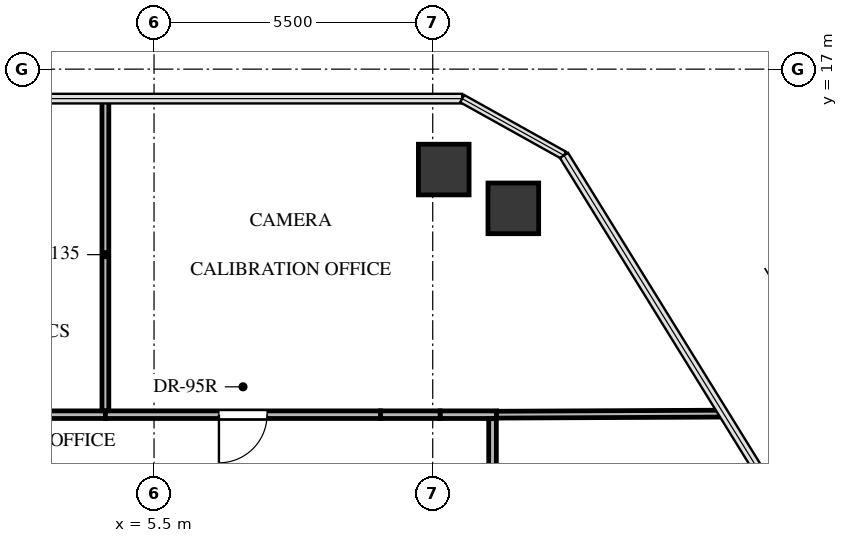
"""IFC4 building model, lengths in metres.
Left out: names, types, materials, properties, quantities, classifications, styles, units other than length and angle.
Written with IfcOpenShell. Run it as: python <this file> out.ifc"""

import sys

from ifc_helpers import new_model, si_unit, direction, frame, frame_2d, origin, origin_2d, place, context, subcontext, project, spatial, rectangle, extrude, source, transform, mapped, element, fill, save


model = new_model("IFC4")
c1 = context("Model", 3, precision=1e-05, world=origin(), true_north=direction((0.0, 1.0)))
c2 = subcontext(c1, "Body", "Model", "MODEL_VIEW")
j1 = project(units=[si_unit("LENGTHUNIT", "METRE"), si_unit("PLANEANGLEUNIT", "RADIAN")], contexts=[c1])
p1 = place(None, origin())
s1 = spatial("IfcSite", under=j1, at=p1, CompositionType="ELEMENT")
p2 = place(p1, origin())
s2 = spatial("IfcBuilding", under=s1, at=p2, CompositionType="ELEMENT")
p3 = place(p2, frame((0.0, 0.0, 159.3)))
s3 = spatial("IfcBuildingStorey", under=s2, at=p3, CompositionType="ELEMENT", Elevation=159.3)
m1 = source(origin(), c2, "Body", "SweptSolid", [
    extrude(rectangle(XDim=1.0, YDim=1.0, at=origin_2d()), origin(), (0.0, 0.0, 1.0), 3.22),
])
for number, where, z_axis, x_axis in (
    (1, (11.218, 15.018, -0.24), (0.0, 0.0, 1.0), (1.0, 0.0, 0.0)),
    (2, (12.591, 14.252, -0.24), (0.0, 0.0, 1.0), (1.0, 0.0, 0.0)),
):
    element("IfcColumn", number, at=place(p3, frame(where, z_axis=z_axis, x_axis=x_axis)), inside=s3, PredefinedType="COLUMN", context=c2, shape_type="MappedRepresentation", body=[
        mapped(m1, transform((0.0, 0.0, 0.0), x_axis=(1.0, 0.0, 0.0), y_axis=(0.0, 1.0, 0.0), z_axis=(0.0, 0.0, 1.0), scale=1.0)),
    ])
p4 = place(p3, frame((4.54, 10.18, 0.0), z_axis=(0.0, 0.0, 1.0), x_axis=(-1.0, 0.0, 0.0)))
e3 = element("IfcWall", 3, at=p4, inside=s3, PredefinedType="PARTITIONING", context=c2, shape_type="SweptSolid", body=[
    extrude(rectangle(XDim=3.451, YDim=0.15, at=frame_2d((1.726, 0.0))), origin(), (0.0, 0.0, 1.0), 2.528),
])
p5 = place(p3, frame((12.26, 10.18, 0.0), z_axis=(0.0, 0.0, 1.0), x_axis=(-1.0, 0.0, 0.0)))
e4 = element("IfcWall", 4, at=p5, inside=s3, PredefinedType="PARTITIONING", context=c2, shape_type="SweptSolid", body=[
    extrude(rectangle(XDim=1.114, YDim=0.15, at=frame_2d((0.557, 0.0))), origin(), (0.0, 0.0, 1.0), 2.965),
])
p6 = place(p3, frame((9.971, 10.18, 0.0), z_axis=(0.0, 0.0, 1.0), x_axis=(-1.0, 0.0, 0.0)))
e5 = element("IfcWall", 5, at=p6, inside=s3, PredefinedType="PARTITIONING", context=c2, shape_type="SweptSolid", body=[
    extrude(rectangle(XDim=5.431, YDim=0.15, at=frame_2d((2.716, 0.0))), origin(), (0.0, 0.0, 1.0), 2.528),
])
p7 = place(p6, frame((2.241, 0.0, 0.0)))
e6 = element("IfcOpeningElement", 6, at=p7, cuts=e5, PredefinedType="OPENING", context=c2, shape_type="SweptSolid", body=[
    extrude(rectangle(XDim=0.95, YDim=2.1, at=frame_2d((0.475, 1.05))), frame((0.0, 0.085, 0.0), z_axis=(0.0, -1.0, 0.0), x_axis=(1.0, 0.0, 0.0)), (0.0, 0.0, 1.0), 0.17),
])
p8 = place(p3, frame((11.146, 10.18, 0.0), z_axis=(0.0, 0.0, 1.0), x_axis=(-1.0, 0.0, 0.0)))
e7 = element("IfcWall", 7, at=p8, inside=s3, PredefinedType="PARTITIONING", context=c2, shape_type="SweptSolid", body=[
    extrude(rectangle(XDim=1.174, YDim=0.15, at=frame_2d((0.587, 0.0))), origin(), (0.0, 0.0, 1.0), 2.162),
])
p9 = place(p3, frame((12.18, 2.49, 0.0), z_axis=(0.0, 0.0, 1.0), x_axis=(0.0, 1.0, 0.0)))
e8 = element("IfcWall", 8, at=p9, inside=s3, PredefinedType="PARTITIONING", context=c2, shape_type="SweptSolid", body=[
    extrude(rectangle(XDim=7.611, YDim=0.15, at=frame_2d((3.806, 0.0))), origin(), (0.0, 0.0, 1.0), 2.965),
])
p10 = place(p9, frame((3.345, 0.0, 0.0)))
e9 = element("IfcOpeningElement", 9, at=p10, cuts=e8, PredefinedType="OPENING", context=c2, shape_type="SweptSolid", body=[
    extrude(rectangle(XDim=0.92, YDim=2.1, at=frame_2d((0.46, 1.05))), frame((0.0, 0.085, 0.0), z_axis=(0.0, -1.0, 0.0), x_axis=(1.0, 0.0, 0.0)), (0.0, 0.0, 1.0), 0.17),
])
p11 = place(p3, frame((4.54, 16.418, 0.0), z_axis=(0.0, 0.0, 1.0), x_axis=(0.0, -1.0, 0.0)))
e10 = element("IfcWall", 10, at=p11, inside=s3, PredefinedType="PARTITIONING", context=c2, shape_type="SweptSolid", body=[
    extrude(rectangle(XDim=6.159, YDim=0.135, at=frame_2d((3.08, 0.0))), origin(), (0.0, 0.0, 1.0), 2.319),
])
p12 = place(p3, frame((16.74, 10.201, 0.0), z_axis=(0.0, 0.0, 1.0), x_axis=(-0.999989522694, -0.004577608714, 0.0)))
e11 = element("IfcWall", 11, at=p12, inside=s3, PredefinedType="PARTITIONING", context=c2, shape_type="SweptSolid", body=[
    extrude(rectangle(XDim=4.48, YDim=0.135, at=frame_2d((2.24, 0.0))), origin(), (0.0, 0.0, 1.0), 2.319),
])
m2 = source(origin(), c2, "Body", "SweptSolid", [
    extrude(rectangle(XDim=0.95, YDim=2.1, at=frame_2d((0.475, 1.05))), frame((0.0, 0.025, 0.0), z_axis=(0.0, -1.0, 0.0), x_axis=(1.0, 0.0, 0.0)), (0.0, 0.0, 1.0), 0.05),
])
p13 = place(p7, origin())
e12 = element("IfcDoor", 12, at=p13, inside=s3, OperationType="SINGLE_SWING_RIGHT", PredefinedType="DOOR", context=c2, shape_type="MappedRepresentation", body=[
    mapped(m2, transform((0.0, 0.0, 0.0), x_axis=(1.0, 0.0, 0.0), y_axis=(0.0, 1.0, 0.0), z_axis=(0.0, 0.0, 1.0), scale=1.0)),
])
fill(e6, e12)
save(model, sys.argv[1])
